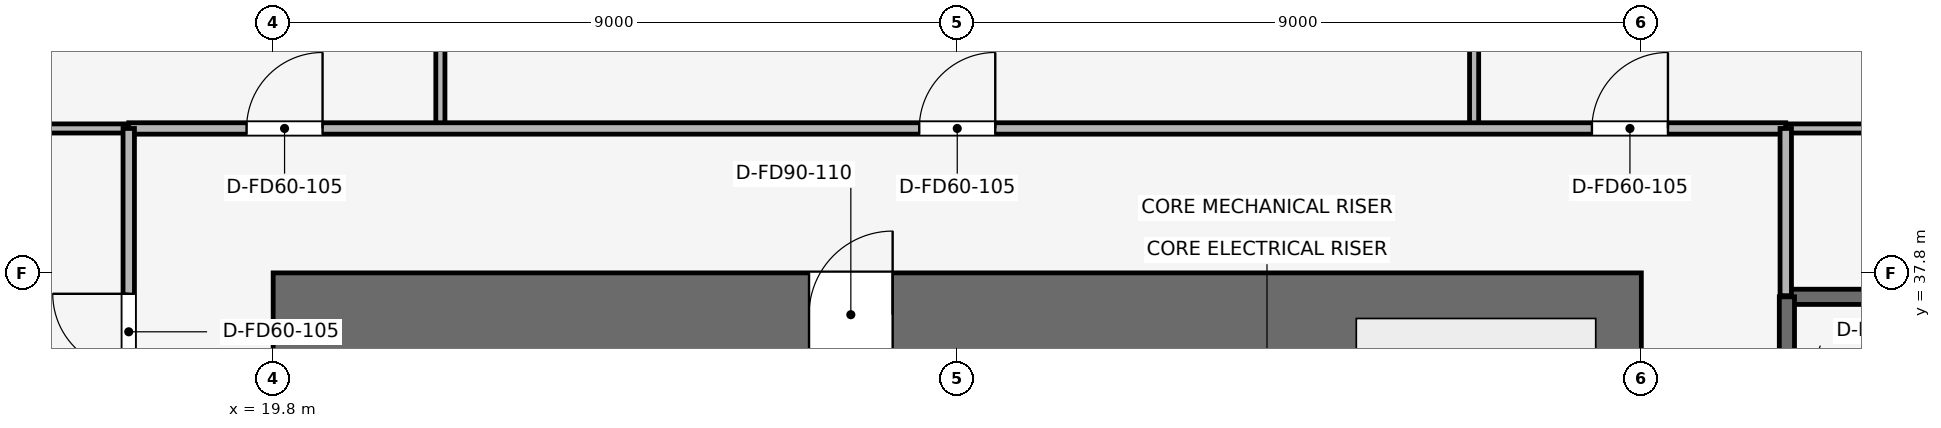
"""IFC4 building model, lengths in metres.
Left out: names, types, materials, properties, quantities, classifications, styles, units other than length and angle.
Written with IfcOpenShell. Run it as: python <this file> out.ifc"""

import sys

from ifc_helpers import new_model, si_unit, direction, frame, frame_2d, origin, place, context, subcontext, project, spatial, rectangle, extrude, element, fill, save


model = new_model("IFC4")
c1 = context("Model", 3, precision=1e-05, world=origin(), true_north=direction((0.0, 1.0)))
c2 = subcontext(c1, "Body", "Model", "MODEL_VIEW")
j1 = project(units=[si_unit("LENGTHUNIT", "METRE"), si_unit("PLANEANGLEUNIT", "RADIAN")], contexts=[c1])
p1 = place(None, origin())
s1 = spatial("IfcSite", under=j1, at=p1, CompositionType="ELEMENT")
p2 = place(p1, origin())
s2 = spatial("IfcBuilding", under=s1, at=p2, CompositionType="ELEMENT")
p3 = place(p2, frame((0.0, 0.0, 8.4)))
s3 = spatial("IfcBuildingStorey", under=s2, at=p3, CompositionType="ELEMENT", Elevation=8.4)
p4 = place(p3, frame((19.8, 37.25, 0.0), z_axis=(0.0, 0.0, 1.0), x_axis=(1.0, 0.0, 0.0)))
e1 = element("IfcWall", 1, at=p4, inside=s3, PredefinedType="SHEAR", context=c2, shape_type="SweptSolid", body=[
    extrude(rectangle(XDim=18.0, YDim=1.1, at=frame_2d((9.0, 0.0))), origin(), (0.0, 0.0, 1.0), 5.4),
])
p5 = place(p4, frame((7.05, 0.0, 0.0)))
e2 = element("IfcOpeningElement", 2, at=p5, cuts=e1, PredefinedType="OPENING", context=c2, shape_type="SweptSolid", body=[
    extrude(rectangle(XDim=1.1, YDim=2.15, at=frame_2d((0.55, 1.075))), frame((0.0, 0.56, 0.0), z_axis=(0.0, -1.0, 0.0), x_axis=(1.0, 0.0, 0.0)), (0.0, 0.0, 1.0), 1.12),
])
p6 = place(p3, frame((39.715, 37.485, 0.0), z_axis=(0.0, 0.0, 1.0), x_axis=(1.0, 0.0, 0.0)))
e3 = element("IfcWall", 3, at=p6, inside=s3, PredefinedType="SHEAR", context=c2, shape_type="SweptSolid", body=[
    extrude(rectangle(XDim=8.57, YDim=0.2, at=frame_2d((4.285, 0.0))), origin(), (0.0, 0.0, 1.0), 5.398),
])
p7 = place(p3, frame((39.715, 34.165, 0.0), z_axis=(0.0, 0.0, 1.0), x_axis=(0.0, 1.0, 0.0)))
e4 = element("IfcWall", 4, at=p7, inside=s3, PredefinedType="SHEAR", context=c2, shape_type="SweptSolid", body=[
    extrude(rectangle(XDim=3.32, YDim=0.2, at=frame_2d((1.66, 0.0))), origin(), (0.0, 0.0, 1.0), 5.398),
])
p8 = place(p7, frame((0.9, 0.0, 0.0)))
e5 = element("IfcOpeningElement", 5, at=p8, cuts=e4, PredefinedType="OPENING", context=c2, shape_type="SweptSolid", body=[
    extrude(rectangle(XDim=1.1, YDim=2.15, at=frame_2d((0.55, 1.075))), frame((0.0, 0.11, 0.0), z_axis=(0.0, -1.0, 0.0), x_axis=(1.0, 0.0, 0.0)), (0.0, 0.0, 1.0), 0.22),
])
for number, where, z_axis, x_axis in (
    (6, (22.0, 39.7, 0.0), (0.0, 0.0, 1.0), (0.0, 1.0, 0.0)),
    (7, (35.6, 39.7, 0.0), (0.0, 0.0, 1.0), (0.0, 1.0, 0.0)),
):
    element("IfcWall", number, at=place(p3, frame(where, z_axis=z_axis, x_axis=x_axis)), inside=s3, PredefinedType="PARTITIONING", context=c2, shape_type="SweptSolid", body=[
        extrude(rectangle(XDim=17.05, YDim=0.12, at=frame_2d((8.525, 0.0))), origin(), (0.0, 0.0, 1.0), 4.035),
    ])
p9 = place(p3, frame((0.85, 39.7, 0.0), z_axis=(0.0, 0.0, 1.0), x_axis=(1.0, 0.0, 0.0)))
e8 = element("IfcWall", 8, at=p9, inside=s3, PredefinedType="PARTITIONING", context=c2, shape_type="SweptSolid", body=[
    extrude(rectangle(XDim=17.05, YDim=0.12, at=frame_2d((8.525, 0.0))), origin(), (0.0, 0.0, 1.0), 4.035),
])
p10 = place(p3, frame((39.7, 39.7, 0.0), z_axis=(0.0, 0.0, 1.0), x_axis=(1.0, 0.0, 0.0)))
e9 = element("IfcWall", 9, at=p10, inside=s3, PredefinedType="PARTITIONING", context=c2, shape_type="SweptSolid", body=[
    extrude(rectangle(XDim=9.3, YDim=0.12, at=frame_2d((4.65, 0.0))), origin(), (0.0, 0.0, 1.0), 5.05),
])
p11 = place(p3, frame((17.9, 39.7, 0.0), z_axis=(0.0, 0.0, 1.0), x_axis=(1.0, 0.0, 0.0)))
e10 = element("IfcWall", 10, at=p11, inside=s3, PredefinedType="PARTITIONING", context=c2, shape_type="SweptSolid", body=[
    extrude(rectangle(XDim=21.8, YDim=0.15, at=frame_2d((10.9, 0.0))), origin(), (0.0, 0.0, 1.0), 4.135),
])
p12 = place(p11, frame((1.55, 0.0, 0.0)))
e11 = element("IfcOpeningElement", 11, at=p12, cuts=e10, PredefinedType="OPENING", context=c2, shape_type="SweptSolid", body=[
    extrude(rectangle(XDim=1.0, YDim=2.15, at=frame_2d((0.5, 1.075))), frame((0.0, 0.085, 0.0), z_axis=(0.0, -1.0, 0.0), x_axis=(1.0, 0.0, 0.0)), (0.0, 0.0, 1.0), 0.17),
])
p13 = place(p11, frame((10.4, 0.0, 0.0)))
e12 = element("IfcOpeningElement", 12, at=p13, cuts=e10, PredefinedType="OPENING", context=c2, shape_type="SweptSolid", body=[
    extrude(rectangle(XDim=1.0, YDim=2.15, at=frame_2d((0.5, 1.075))), frame((0.0, 0.085, 0.0), z_axis=(0.0, -1.0, 0.0), x_axis=(1.0, 0.0, 0.0)), (0.0, 0.0, 1.0), 0.17),
])
p14 = place(p11, frame((19.25, 0.0, 0.0)))
e13 = element("IfcOpeningElement", 13, at=p14, cuts=e10, PredefinedType="OPENING", context=c2, shape_type="SweptSolid", body=[
    extrude(rectangle(XDim=1.0, YDim=2.15, at=frame_2d((0.5, 1.075))), frame((0.0, 0.085, 0.0), z_axis=(0.0, -1.0, 0.0), x_axis=(1.0, 0.0, 0.0)), (0.0, 0.0, 1.0), 0.17),
])
p15 = place(p3, frame((17.9, 23.45, 0.0), z_axis=(0.0, 0.0, 1.0), x_axis=(0.0, 1.0, 0.0)))
e14 = element("IfcWall", 14, at=p15, inside=s3, PredefinedType="PARTITIONING", context=c2, shape_type="SweptSolid", body=[
    extrude(rectangle(XDim=16.25, YDim=0.15, at=frame_2d((8.125, 0.0))), origin(), (0.0, 0.0, 1.0), 4.135),
])
p16 = place(p15, frame((1.9, 0.0, 0.0)))
e15 = element("IfcOpeningElement", 15, at=p16, cuts=e14, PredefinedType="OPENING", context=c2, shape_type="SweptSolid", body=[
    extrude(rectangle(XDim=0.9, YDim=2.1, at=frame_2d((0.45, 1.05))), frame((0.0, 0.085, 0.0), z_axis=(0.0, -1.0, 0.0), x_axis=(1.0, 0.0, 0.0)), (0.0, 0.0, 1.0), 0.17),
])
p17 = place(p15, frame((5.6, 0.0, 0.0)))
e16 = element("IfcOpeningElement", 16, at=p17, cuts=e14, PredefinedType="OPENING", context=c2, shape_type="SweptSolid", body=[
    extrude(rectangle(XDim=0.9, YDim=2.1, at=frame_2d((0.45, 1.05))), frame((0.0, 0.085, 0.0), z_axis=(0.0, -1.0, 0.0), x_axis=(1.0, 0.0, 0.0)), (0.0, 0.0, 1.0), 0.17),
])
p18 = place(p15, frame((8.85, 0.0, 0.0)))
e17 = element("IfcOpeningElement", 17, at=p18, cuts=e14, PredefinedType="OPENING", context=c2, shape_type="SweptSolid", body=[
    extrude(rectangle(XDim=0.95, YDim=2.1, at=frame_2d((0.475, 1.05))), frame((0.0, 0.085, 0.0), z_axis=(0.0, -1.0, 0.0), x_axis=(1.0, 0.0, 0.0)), (0.0, 0.0, 1.0), 0.17),
])
p19 = place(p15, frame((13.075, 0.0, 0.0)))
e18 = element("IfcOpeningElement", 18, at=p19, cuts=e14, PredefinedType="OPENING", context=c2, shape_type="SweptSolid", body=[
    extrude(rectangle(XDim=1.0, YDim=2.15, at=frame_2d((0.5, 1.075))), frame((0.0, 0.085, 0.0), z_axis=(0.0, -1.0, 0.0), x_axis=(1.0, 0.0, 0.0)), (0.0, 0.0, 1.0), 0.17),
])
p20 = place(p3, frame((39.7, 37.5, 0.0), z_axis=(0.0, 0.0, 1.0), x_axis=(0.0, 1.0, 0.0)))
e19 = element("IfcWall", 19, at=p20, inside=s3, PredefinedType="PARTITIONING", context=c2, shape_type="SweptSolid", body=[
    extrude(rectangle(XDim=2.2, YDim=0.15, at=frame_2d((1.1, 0.0))), origin(), (0.0, 0.0, 1.0), 5.05),
])
p21 = place(p12, origin())
e20 = element("IfcDoor", 20, at=p21, inside=s3, OperationType="SINGLE_SWING_RIGHT", PredefinedType="DOOR", context=c2, shape_type="SweptSolid", body=[
    extrude(rectangle(XDim=1.0, YDim=2.15, at=frame_2d((0.5, 1.075))), frame((0.0, 0.025, 0.0), z_axis=(0.0, -1.0, 0.0), x_axis=(1.0, 0.0, 0.0)), (0.0, 0.0, 1.0), 0.05),
])
fill(e11, e20)
p22 = place(p13, origin())
e21 = element("IfcDoor", 21, at=p22, inside=s3, OperationType="SINGLE_SWING_RIGHT", PredefinedType="DOOR", context=c2, shape_type="SweptSolid", body=[
    extrude(rectangle(XDim=1.0, YDim=2.15, at=frame_2d((0.5, 1.075))), frame((0.0, 0.025, 0.0), z_axis=(0.0, -1.0, 0.0), x_axis=(1.0, 0.0, 0.0)), (0.0, 0.0, 1.0), 0.05),
])
fill(e12, e21)
p23 = place(p14, origin())
e22 = element("IfcDoor", 22, at=p23, inside=s3, OperationType="SINGLE_SWING_RIGHT", PredefinedType="DOOR", context=c2, shape_type="SweptSolid", body=[
    extrude(rectangle(XDim=1.0, YDim=2.15, at=frame_2d((0.5, 1.075))), frame((0.0, 0.025, 0.0), z_axis=(0.0, -1.0, 0.0), x_axis=(1.0, 0.0, 0.0)), (0.0, 0.0, 1.0), 0.05),
])
fill(e13, e22)
p24 = place(p19, origin())
e23 = element("IfcDoor", 23, at=p24, inside=s3, OperationType="SINGLE_SWING_RIGHT", PredefinedType="DOOR", context=c2, shape_type="SweptSolid", body=[
    extrude(rectangle(XDim=1.0, YDim=2.15, at=frame_2d((0.5, 1.075))), frame((0.0, 0.025, 0.0), z_axis=(0.0, -1.0, 0.0), x_axis=(1.0, 0.0, 0.0)), (0.0, 0.0, 1.0), 0.05),
])
fill(e18, e23)
p25 = place(p5, origin())
e24 = element("IfcDoor", 24, at=p25, inside=s3, OperationType="SINGLE_SWING_RIGHT", PredefinedType="DOOR", context=c2, shape_type="SweptSolid", body=[
    extrude(rectangle(XDim=1.1, YDim=2.15, at=frame_2d((0.55, 1.075))), frame((0.0, 0.025, 0.0), z_axis=(0.0, -1.0, 0.0), x_axis=(1.0, 0.0, 0.0)), (0.0, 0.0, 1.0), 0.05),
])
fill(e2, e24)
save(model, sys.argv[1])
